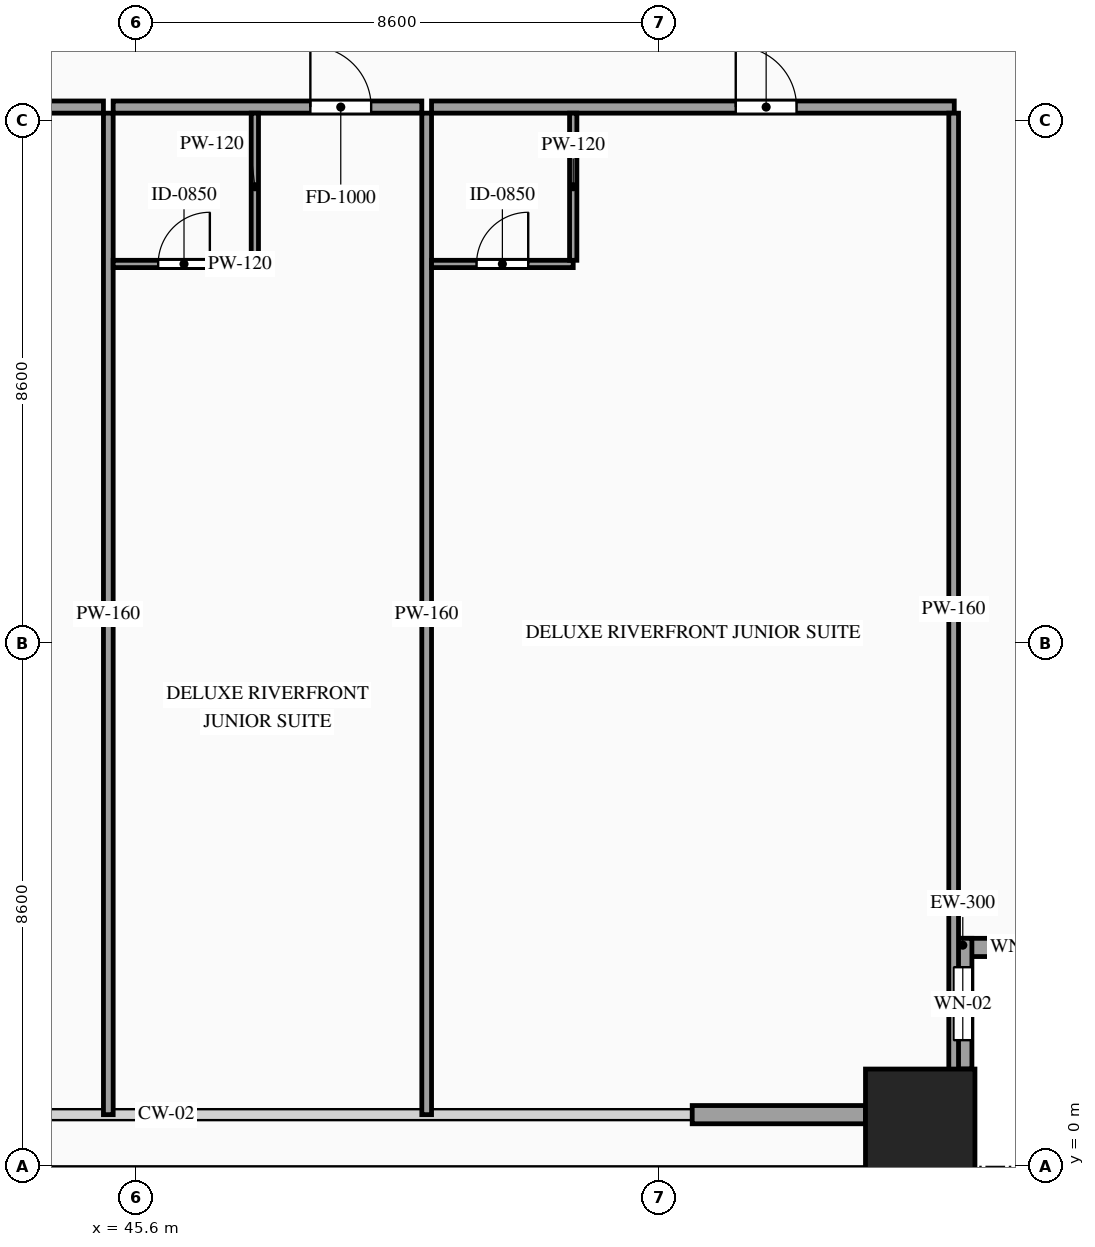
"""IFC4 building model, lengths in metres.
Left out: names, types, materials, properties, quantities, classifications, styles, units other than length and angle.
Written with IfcOpenShell. Run it as: python <this file> out.ifc"""

import sys

from ifc_helpers import new_model, si_unit, direction, frame, frame_2d, origin, origin_2d, place, context, subcontext, project, spatial, rectangle, hollow_rectangle, extrude, source, transform, mapped, element, fill, save


model = new_model("IFC4")
c1 = context("Model", 3, precision=1e-05, world=origin(), true_north=direction((0.0, 1.0)))
c2 = subcontext(c1, "Body", "Model", "MODEL_VIEW")
j1 = project(units=[si_unit("LENGTHUNIT", "METRE"), si_unit("PLANEANGLEUNIT", "RADIAN")], contexts=[c1])
p1 = place(None, origin())
s1 = spatial("IfcSite", under=j1, at=p1, CompositionType="ELEMENT")
p2 = place(p1, origin())
s2 = spatial("IfcBuilding", under=s1, at=p2, CompositionType="ELEMENT")
p3 = place(p2, frame((0.0, 0.0, 60.4)))
s3 = spatial("IfcBuildingStorey", under=s2, at=p3, CompositionType="ELEMENT", Elevation=60.4)
m1 = source(origin(), c2, "Body", "SweptSolid", [
    extrude(hollow_rectangle(XDim=1.8, YDim=1.8, WallThickness=0.08, at=origin_2d()), origin(), (0.0, 0.0, 1.0), 3.6),
])
p4 = place(p3, frame((58.5, 0.7, 0.0), z_axis=(0.0, 0.0, 1.0), x_axis=(1.0, 0.0, 0.0)))
e1 = element("IfcColumn", 1, at=p4, inside=s3, PredefinedType="COLUMN", context=c2, shape_type="MappedRepresentation", body=[
    mapped(m1, transform((0.0, 0.0, 0.0), scale=1.0)),
])
p5 = place(p3, frame((59.05, 3.6, 0.0), z_axis=(0.0, 0.0, 1.0), x_axis=(1.0, 0.0, 0.0)))
e2 = element("IfcWall", 2, at=p5, inside=s3, PredefinedType="SOLIDWALL", context=c2, shape_type="SweptSolid", body=[
    extrude(rectangle(XDim=2.15, YDim=0.3, at=frame_2d((1.075, 0.0))), origin(), (0.0, 0.0, 1.0), 3.38),
])
p6 = place(p5, frame((0.625, 0.0, 0.85)))
e3 = element("IfcOpeningElement", 3, at=p6, cuts=e2, PredefinedType="OPENING", context=c2, shape_type="SweptSolid", body=[
    extrude(rectangle(XDim=0.9, YDim=1.5, at=frame_2d((0.45, 0.75))), frame((0.0, 0.165, 0.0), z_axis=(0.0, -1.0, 0.0), x_axis=(1.0, 0.0, 0.0)), (0.0, 0.0, 1.0), 0.33),
])
p7 = place(p3, frame((59.2, 1.6, 0.0), z_axis=(0.0, 0.0, 1.0), x_axis=(0.0, 1.0, 0.0)))
e4 = element("IfcWall", 4, at=p7, inside=s3, PredefinedType="SOLIDWALL", context=c2, shape_type="SweptSolid", body=[
    extrude(rectangle(XDim=2.15, YDim=0.3, at=frame_2d((1.075, 0.0))), origin(), (0.0, 0.0, 1.0), 3.38),
])
p8 = place(p7, frame((0.475, 0.0, 0.85)))
e5 = element("IfcOpeningElement", 5, at=p8, cuts=e4, PredefinedType="OPENING", context=c2, shape_type="SweptSolid", body=[
    extrude(rectangle(XDim=1.2, YDim=2.1, at=frame_2d((0.6, 1.05))), frame((0.0, 0.165, 0.0), z_axis=(0.0, -1.0, 0.0), x_axis=(1.0, 0.0, 0.0)), (0.0, 0.0, 1.0), 0.33),
])
m2 = source(origin(), c2, "Body", "SweptSolid", [
    extrude(rectangle(XDim=2.85, YDim=0.3, at=frame_2d((1.425, 0.0))), origin(), (0.0, 0.0, 1.0), 2.775),
])
p9 = place(p3, frame((54.75, 0.85, 0.0), z_axis=(0.0, 0.0, 1.0), x_axis=(1.0, 0.0, 0.0)))
e6 = element("IfcWall", 6, at=p9, inside=s3, PredefinedType="SOLIDWALL", context=c2, shape_type="MappedRepresentation", body=[
    mapped(m2, transform((0.0, 0.0, 0.0), scale=1.0)),
])
p10 = place(p3, frame((35.756, 17.42, 0.0), z_axis=(0.0, 0.0, 1.0), x_axis=(1.0, 0.0, 0.0)))
e7 = element("IfcWall", 7, at=p10, inside=s3, PredefinedType="PARTITIONING", context=c2, shape_type="SweptSolid", body=[
    extrude(rectangle(XDim=9.311, YDim=0.2, at=frame_2d((4.655, 0.0))), origin(), (0.0, 0.0, 1.0), 3.38),
])
p11 = place(p10, frame((5.361, 0.0, 0.0)))
e8 = element("IfcOpeningElement", 8, at=p11, cuts=e7, PredefinedType="OPENING", context=c2, shape_type="SweptSolid", body=[
    extrude(rectangle(XDim=1.0, YDim=2.2, at=frame_2d((0.5, 1.1))), frame((0.0, 0.115, 0.0), z_axis=(0.0, -1.0, 0.0), x_axis=(1.0, 0.0, 0.0)), (0.0, 0.0, 1.0), 0.23),
])
m3 = source(origin(), c2, "Body", "SweptSolid", [
    extrude(rectangle(XDim=16.47, YDim=0.16, at=frame_2d((8.235, 0.0))), origin(), (0.0, 0.0, 1.0), 3.38),
])
p12 = place(p3, frame((45.147, 0.85, 0.0), z_axis=(0.0, 0.0, 1.0), x_axis=(0.0, 1.0, 0.0)))
e9 = element("IfcWall", 9, at=p12, inside=s3, PredefinedType="PARTITIONING", context=c2, shape_type="MappedRepresentation", body=[
    mapped(m3, transform((0.0, 0.0, 0.0), scale=1.0)),
])
p13 = place(p3, frame((45.227, 17.42, 0.0), z_axis=(0.0, 0.0, 1.0), x_axis=(1.0, 0.0, 0.0)))
e10 = element("IfcWall", 10, at=p13, inside=s3, PredefinedType="PARTITIONING", context=c2, shape_type="SweptSolid", body=[
    extrude(rectangle(XDim=5.076, YDim=0.2, at=frame_2d((2.538, 0.0))), origin(), (0.0, 0.0, 1.0), 3.38),
])
p14 = place(p13, frame((3.243, 0.0, 0.0)))
e11 = element("IfcOpeningElement", 11, at=p14, cuts=e10, PredefinedType="OPENING", context=c2, shape_type="SweptSolid", body=[
    extrude(rectangle(XDim=1.0, YDim=2.2, at=frame_2d((0.5, 1.1))), frame((0.0, 0.115, 0.0), z_axis=(0.0, -1.0, 0.0), x_axis=(1.0, 0.0, 0.0)), (0.0, 0.0, 1.0), 0.23),
])
p15 = place(p3, frame((50.383, 0.85, 0.0), z_axis=(0.0, 0.0, 1.0), x_axis=(0.0, 1.0, 0.0)))
e12 = element("IfcWall", 12, at=p15, inside=s3, PredefinedType="PARTITIONING", context=c2, shape_type="MappedRepresentation", body=[
    mapped(m3, transform((0.0, 0.0, 0.0), scale=1.0)),
])
p16 = place(p3, frame((45.227, 14.84, 0.0), z_axis=(0.0, 0.0, 1.0), x_axis=(1.0, 0.0, 0.0)))
e13 = element("IfcWall", 13, at=p16, inside=s3, PredefinedType="PARTITIONING", context=c2, shape_type="SweptSolid", body=[
    extrude(rectangle(XDim=2.33, YDim=0.12, at=frame_2d((1.165, 0.0))), origin(), (0.0, 0.0, 1.0), 3.38),
])
p17 = place(p16, frame((0.74, 0.0, 0.0)))
e14 = element("IfcOpeningElement", 14, at=p17, cuts=e13, PredefinedType="OPENING", context=c2, shape_type="SweptSolid", body=[
    extrude(rectangle(XDim=0.85, YDim=2.1, at=frame_2d((0.425, 1.05))), frame((0.0, 0.075, 0.0), z_axis=(0.0, -1.0, 0.0), x_axis=(1.0, 0.0, 0.0)), (0.0, 0.0, 1.0), 0.15),
])
m4 = source(origin(), c2, "Body", "SweptSolid", [
    extrude(rectangle(XDim=2.42, YDim=0.12, at=frame_2d((1.21, 0.0))), origin(), (0.0, 0.0, 1.0), 3.38),
])
p18 = place(p3, frame((47.557, 14.9, 0.0), z_axis=(0.0, 0.0, 1.0), x_axis=(0.0, 1.0, 0.0)))
e15 = element("IfcWall", 15, at=p18, inside=s3, PredefinedType="PARTITIONING", context=c2, shape_type="MappedRepresentation", body=[
    mapped(m4, transform((0.0, 0.0, 0.0), scale=1.0)),
])
p19 = place(p3, frame((50.463, 17.42, 0.0), z_axis=(0.0, 0.0, 1.0), x_axis=(1.0, 0.0, 0.0)))
e16 = element("IfcWall", 16, at=p19, inside=s3, PredefinedType="PARTITIONING", context=c2, shape_type="SweptSolid", body=[
    extrude(rectangle(XDim=8.597, YDim=0.2, at=frame_2d((4.299, 0.0))), origin(), (0.0, 0.0, 1.0), 3.38),
])
p20 = place(p19, frame((5.003, 0.0, 0.0)))
e17 = element("IfcOpeningElement", 17, at=p20, cuts=e16, PredefinedType="OPENING", context=c2, shape_type="SweptSolid", body=[
    extrude(rectangle(XDim=1.0, YDim=2.2, at=frame_2d((0.5, 1.1))), frame((0.0, 0.115, 0.0), z_axis=(0.0, -1.0, 0.0), x_axis=(1.0, 0.0, 0.0)), (0.0, 0.0, 1.0), 0.23),
])
m5 = source(origin(), c2, "Body", "SweptSolid", [
    extrude(rectangle(XDim=16.32, YDim=0.16, at=frame_2d((8.16, 0.0))), origin(), (0.0, 0.0, 1.0), 3.38),
])
p21 = place(p3, frame((59.05, 1.0, 0.0), z_axis=(0.0, 0.0, 1.0), x_axis=(0.0, 1.0, 0.0)))
e18 = element("IfcWall", 18, at=p21, inside=s3, PredefinedType="PARTITIONING", context=c2, shape_type="MappedRepresentation", body=[
    mapped(m5, transform((0.0, 0.0, 0.0), scale=1.0)),
])
p22 = place(p3, frame((50.463, 14.84, 0.0), z_axis=(0.0, 0.0, 1.0), x_axis=(1.0, 0.0, 0.0)))
e19 = element("IfcWall", 19, at=p22, inside=s3, PredefinedType="PARTITIONING", context=c2, shape_type="SweptSolid", body=[
    extrude(rectangle(XDim=2.33, YDim=0.12, at=frame_2d((1.165, 0.0))), origin(), (0.0, 0.0, 1.0), 3.38),
])
p23 = place(p22, frame((0.74, 0.0, 0.0)))
e20 = element("IfcOpeningElement", 20, at=p23, cuts=e19, PredefinedType="OPENING", context=c2, shape_type="SweptSolid", body=[
    extrude(rectangle(XDim=0.85, YDim=2.1, at=frame_2d((0.425, 1.05))), frame((0.0, 0.075, 0.0), z_axis=(0.0, -1.0, 0.0), x_axis=(1.0, 0.0, 0.0)), (0.0, 0.0, 1.0), 0.15),
])
p24 = place(p3, frame((52.793, 14.9, 0.0), z_axis=(0.0, 0.0, 1.0), x_axis=(0.0, 1.0, 0.0)))
e21 = element("IfcWall", 21, at=p24, inside=s3, PredefinedType="PARTITIONING", context=c2, shape_type="MappedRepresentation", body=[
    mapped(m4, transform((0.0, 0.0, 0.0), scale=1.0)),
])
m6 = source(origin(), c2, "Body", "SweptSolid", [
    extrude(rectangle(XDim=0.9, YDim=1.5, at=frame_2d((0.45, 0.75))), frame((0.0, 0.03, 0.0), z_axis=(0.0, -1.0, 0.0), x_axis=(1.0, 0.0, 0.0)), (0.0, 0.0, 1.0), 0.06),
])
p25 = place(p6, origin())
e22 = element("IfcWindow", 22, at=p25, inside=s3, PartitioningType="SINGLE_PANEL", PredefinedType="WINDOW", context=c2, shape_type="MappedRepresentation", body=[
    mapped(m6, transform((0.0, 0.0, 0.0), scale=1.0)),
])
fill(e3, e22)
m7 = source(origin(), c2, "Body", "SweptSolid", [
    extrude(rectangle(XDim=1.2, YDim=2.1, at=frame_2d((0.6, 1.05))), frame((0.0, 0.03, 0.0), z_axis=(0.0, -1.0, 0.0), x_axis=(1.0, 0.0, 0.0)), (0.0, 0.0, 1.0), 0.06),
])
p26 = place(p8, origin())
e23 = element("IfcWindow", 23, at=p26, inside=s3, PartitioningType="SINGLE_PANEL", PredefinedType="WINDOW", context=c2, shape_type="MappedRepresentation", body=[
    mapped(m7, transform((0.0, 0.0, 0.0), scale=1.0)),
])
fill(e5, e23)
m8 = source(origin(), c2, "Body", "SweptSolid", [
    extrude(rectangle(XDim=1.0, YDim=2.2, at=frame_2d((0.5, 1.1))), frame((0.0, 0.025, 0.0), z_axis=(0.0, -1.0, 0.0), x_axis=(1.0, 0.0, 0.0)), (0.0, 0.0, 1.0), 0.05),
])
p27 = place(p14, origin())
e24 = element("IfcDoor", 24, at=p27, inside=s3, OperationType="SINGLE_SWING_LEFT", PredefinedType="DOOR", context=c2, shape_type="MappedRepresentation", body=[
    mapped(m8, transform((0.0, 0.0, 0.0), scale=1.0)),
])
fill(e11, e24)
m9 = source(origin(), c2, "Body", "SweptSolid", [
    extrude(rectangle(XDim=0.85, YDim=2.1, at=frame_2d((0.425, 1.05))), frame((0.0, 0.025, 0.0), z_axis=(0.0, -1.0, 0.0), x_axis=(1.0, 0.0, 0.0)), (0.0, 0.0, 1.0), 0.05),
])
p28 = place(p17, origin())
e25 = element("IfcDoor", 25, at=p28, inside=s3, OperationType="SINGLE_SWING_RIGHT", PredefinedType="DOOR", context=c2, shape_type="MappedRepresentation", body=[
    mapped(m9, transform((0.0, 0.0, 0.0), scale=1.0)),
])
fill(e14, e25)
p29 = place(p20, origin())
e26 = element("IfcDoor", 26, at=p29, inside=s3, OperationType="SINGLE_SWING_LEFT", PredefinedType="DOOR", context=c2, shape_type="MappedRepresentation", body=[
    mapped(m8, transform((0.0, 0.0, 0.0), scale=1.0)),
])
fill(e17, e26)
p30 = place(p23, origin())
e27 = element("IfcDoor", 27, at=p30, inside=s3, OperationType="SINGLE_SWING_RIGHT", PredefinedType="DOOR", context=c2, shape_type="MappedRepresentation", body=[
    mapped(m9, transform((0.0, 0.0, 0.0), scale=1.0)),
])
fill(e20, e27)
save(model, sys.argv[1])
